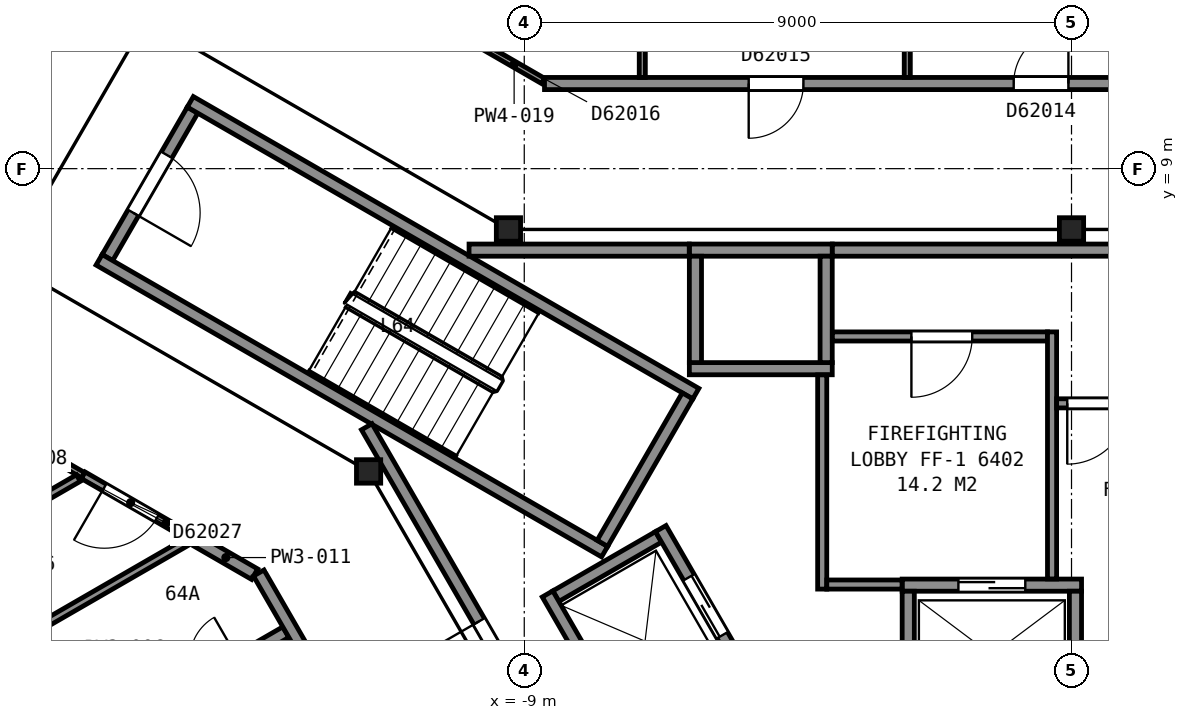
"""IFC4 building model, lengths in metres.
Left out: names, types, materials, properties, quantities, classifications, styles, units other than length and angle.
Written with IfcOpenShell. Run it as: python <this file> out.ifc"""

import sys

from ifc_helpers import new_model, si_unit, direction, frame, frame_2d, origin, origin_2d, place, context, subcontext, project, spatial, rectangle, i_section, extrude, element, fill, save


model = new_model("IFC4")
c1 = context("Model", 3, precision=1e-05, world=origin(), true_north=direction((0.0, 1.0)))
c2 = subcontext(c1, "Body", "Model", "MODEL_VIEW")
j1 = project(units=[si_unit("LENGTHUNIT", "METRE"), si_unit("PLANEANGLEUNIT", "RADIAN")], contexts=[c1])
p1 = place(None, origin())
s1 = spatial("IfcSite", under=j1, at=p1, CompositionType="ELEMENT")
p2 = place(p1, origin())
s2 = spatial("IfcBuilding", under=s1, at=p2, CompositionType="ELEMENT")
p3 = place(p2, frame((0.0, 0.0, 254.5)))
s3 = spatial("IfcBuildingStorey", under=s2, at=p3, CompositionType="ELEMENT", Elevation=254.5)
p4 = place(p3, frame((0.0, 8.0, 0.0), z_axis=(0.0, 0.0, 1.0), x_axis=(1.0, 0.0, 0.0)))
e1 = element("IfcColumn", 1, at=p4, inside=s3, PredefinedType="COLUMN", context=c2, shape_type="SweptSolid", body=[
    extrude(i_section(OverallWidth=0.399, OverallDepth=0.386, WebThickness=0.021, FlangeThickness=0.033, FilletRadius=0.015, at=origin_2d()), origin(), (0.0, 0.0, 1.0), 3.67),
])
for number, where, z_axis, x_axis in (
    (2, (-9.26, 8.0, 0.0), (0.0, 0.0, 1.0), (1.0, 0.0, 0.0)),
    (3, (-11.56, 4.02, 0.0), (0.0, 0.0, 1.0), (1.0, 0.0, 0.0)),
):
    element("IfcColumn", number, at=place(p3, frame(where, z_axis=z_axis, x_axis=x_axis)), inside=s3, PredefinedType="COLUMN", context=c2, shape_type="SweptSolid", body=[
        extrude(i_section(OverallWidth=0.399, OverallDepth=0.386, WebThickness=0.021, FlangeThickness=0.033, FilletRadius=0.015, at=origin_2d()), origin(), (0.0, 0.0, 1.0), 3.635),
    ])
p5 = place(p3, frame((-14.455, 9.962, 0.0), z_axis=(0.0, 0.0, 1.0), x_axis=(-0.500049511043, -0.865996816683, 0.0)))
e4 = element("IfcWall", 4, at=p5, inside=s3, PredefinedType="PARTITIONING", context=c2, shape_type="SweptSolid", body=[
    extrude(rectangle(XDim=2.8, YDim=0.2, at=frame_2d((1.4, 0.0))), origin(), (0.0, 0.0, 1.0), 3.45),
])
p6 = place(p5, frame((0.85, 0.0, 0.0)))
e5 = element("IfcOpeningElement", 5, at=p6, cuts=e4, PredefinedType="OPENING", context=c2, shape_type="SweptSolid", body=[
    extrude(rectangle(XDim=1.1, YDim=2.1, at=frame_2d((0.55, 1.05))), frame((0.0, 0.11, 0.0), z_axis=(0.0, -1.0, 0.0), x_axis=(1.0, 0.0, 0.0)), (0.0, 0.0, 1.0), 0.22),
])
for number, where, z_axis, x_axis in (
    (6, (-7.678, 2.701, 0.0), (0.0, 0.0, 1.0), (-0.866, 0.5, 0.0)),
    (7, (-6.178, 5.299, 0.0), (0.0, 0.0, 1.0), (-0.866, 0.5, 0.0)),
):
    element("IfcWall", number, at=place(p3, frame(where, z_axis=z_axis, x_axis=x_axis)), inside=s3, PredefinedType="PARTITIONING", context=c2, shape_type="SweptSolid", body=[
        extrude(rectangle(XDim=9.6, YDim=0.2, at=frame_2d((4.8, 0.0))), origin(), (0.0, 0.0, 1.0), 3.45),
    ])
p7 = place(p3, frame((-6.315, 5.262, 0.0), z_axis=(0.0, 0.0, 1.0), x_axis=(-0.500049511043, -0.865996816683, 0.0)))
e8 = element("IfcWall", 8, at=p7, inside=s3, PredefinedType="PARTITIONING", context=c2, shape_type="SweptSolid", body=[
    extrude(rectangle(XDim=2.8, YDim=0.2, at=frame_2d((1.4, 0.0))), origin(), (0.0, 0.0, 1.0), 3.45),
])
p8 = place(p3, frame((-2.785, 2.15, 0.0), z_axis=(0.0, 0.0, 1.0), x_axis=(1.0, 0.0, 0.0)))
e9 = element("IfcWall", 9, at=p8, inside=s3, PredefinedType="PARTITIONING", context=c2, shape_type="SweptSolid", body=[
    extrude(rectangle(XDim=2.95, YDim=0.2, at=frame_2d((1.475, 0.0))), origin(), (0.0, 0.0, 1.0), 3.7),
])
p9 = place(p8, frame((0.925, 0.0, 0.0)))
e10 = element("IfcOpeningElement", 10, at=p9, cuts=e9, PredefinedType="OPENING", context=c2, shape_type="SweptSolid", body=[
    extrude(rectangle(XDim=1.1, YDim=2.1, at=frame_2d((0.55, 1.05))), frame((0.0, 0.11, 0.0), z_axis=(0.0, -1.0, 0.0), x_axis=(1.0, 0.0, 0.0)), (0.0, 0.0, 1.0), 0.22),
])
for number, where, z_axis, x_axis in (
    (11, (-6.285, 5.71, 0.0), (0.0, 0.0, 1.0), (1.0, 0.0, 0.0)),
    (12, (-6.285, 7.66, 0.0), (0.0, 0.0, 1.0), (1.0, 0.0, 0.0)),
):
    element("IfcWall", number, at=place(p3, frame(where, z_axis=z_axis, x_axis=x_axis)), inside=s3, PredefinedType="PARTITIONING", context=c2, shape_type="SweptSolid", body=[
        extrude(rectangle(XDim=2.35, YDim=0.2, at=frame_2d((1.175, 0.0))), origin(), (0.0, 0.0, 1.0), 3.7),
    ])
for number, where, z_axis, x_axis in (
    (13, (-8.48, 1.969, 0.0), (0.0, 0.0, 1.0), (0.866, 0.5, 0.0)),
    (14, (0.065, 0.1, 0.0), (0.0, 0.0, 1.0), (0.0, 1.0, 0.0)),
    (15, (-2.685, 0.1, 0.0), (0.0, 0.0, 1.0), (0.0, 1.0, 0.0)),
):
    element("IfcWall", number, at=place(p3, frame(where, z_axis=z_axis, x_axis=x_axis)), inside=s3, PredefinedType="PARTITIONING", context=c2, shape_type="SweptSolid", body=[
        extrude(rectangle(XDim=1.95, YDim=0.2, at=frame_2d((0.975, 0.0))), origin(), (0.0, 0.0, 1.0), 3.7),
    ])
for number, where, z_axis, x_axis in (
    (16, (-4.035, 5.81, 0.0), (0.0, 0.0, 1.0), (0.0, 1.0, 0.0)),
    (17, (-6.185, 5.81, 0.0), (0.0, 0.0, 1.0), (0.0, 1.0, 0.0)),
):
    element("IfcWall", number, at=place(p3, frame(where, z_axis=z_axis, x_axis=x_axis)), inside=s3, PredefinedType="PARTITIONING", context=c2, shape_type="SweptSolid", body=[
        extrude(rectangle(XDim=1.75, YDim=0.2, at=frame_2d((0.875, 0.0))), origin(), (0.0, 0.0, 1.0), 3.7),
    ])
p10 = place(p3, frame((-5.28, 0.525, 0.0), z_axis=(0.0, 0.0, 1.0), x_axis=(-0.500037662692, 0.866003658127, 0.0)))
e18 = element("IfcWall", 18, at=p10, inside=s3, PredefinedType="PARTITIONING", context=c2, shape_type="SweptSolid", body=[
    extrude(rectangle(XDim=2.95, YDim=0.2, at=frame_2d((1.475, 0.0))), origin(), (0.0, 0.0, 1.0), 3.7),
])
p11 = place(p10, frame((0.925, 0.0, 0.0)))
e19 = element("IfcOpeningElement", 19, at=p11, cuts=e18, PredefinedType="OPENING", context=c2, shape_type="SweptSolid", body=[
    extrude(rectangle(XDim=1.1, YDim=2.1, at=frame_2d((0.55, 1.05))), frame((0.0, 0.11, 0.0), z_axis=(0.0, -1.0, 0.0), x_axis=(1.0, 0.0, 0.0)), (0.0, 0.0, 1.0), 0.22),
])
p12 = place(p3, frame((-7.242, -0.376, 0.0), z_axis=(0.0, 0.0, 1.0), x_axis=(-0.499996545922, 0.866027397988, 0.0)))
e20 = element("IfcWall", 20, at=p12, inside=s3, PredefinedType="PARTITIONING", context=c2, shape_type="SweptSolid", body=[
    extrude(rectangle(XDim=2.75, YDim=0.2, at=frame_2d((1.375, 0.0))), origin(), (0.0, 0.0, 1.0), 3.7),
])
p13 = place(p3, frame((-11.591, 4.755, 0.0), z_axis=(0.0, 0.0, 1.0), x_axis=(0.500043977787, -0.866000011708, 0.0)))
e21 = element("IfcWall", 21, at=p13, inside=s3, PredefinedType="PARTITIONING", context=c2, shape_type="SweptSolid", body=[
    extrude(rectangle(XDim=6.617, YDim=0.2, at=frame_2d((3.308, 0.0))), origin(), (0.0, 0.0, 1.0), 3.45),
])
p14 = place(p13, frame((3.695, 0.0, 0.0)))
e22 = element("IfcOpeningElement", 22, at=p14, cuts=e21, PredefinedType="OPENING", context=c2, shape_type="SweptSolid", body=[
    extrude(rectangle(XDim=1.8, YDim=2.1, at=frame_2d((0.9, 1.05))), frame((0.0, 0.11, 0.0), z_axis=(0.0, -1.0, 0.0), x_axis=(1.0, 0.0, 0.0)), (0.0, 0.0, 1.0), 0.22),
])
p15 = place(p3, frame((-9.908, 7.66, 0.0), z_axis=(0.0, 0.0, 1.0), x_axis=(1.0, 0.0, 0.0)))
e23 = element("IfcWall", 23, at=p15, inside=s3, PredefinedType="PARTITIONING", context=c2, shape_type="SweptSolid", body=[
    extrude(rectangle(XDim=3.621, YDim=0.2, at=frame_2d((1.811, 0.0))), origin(), (0.0, 0.0, 1.0), 3.45),
])
p16 = place(p3, frame((-4.1, 2.085, 0.0), z_axis=(0.0, 0.0, 1.0), x_axis=(0.0, 1.0, 0.0)))
e24 = element("IfcWall", 24, at=p16, inside=s3, PredefinedType="PARTITIONING", context=c2, shape_type="SweptSolid", body=[
    extrude(rectangle(XDim=3.523, YDim=0.15, at=frame_2d((1.761, 0.0))), origin(), (0.0, 0.0, 1.0), 3.45),
])
p17 = place(p3, frame((-4.025, 2.16, 0.0), z_axis=(0.0, 0.0, 1.0), x_axis=(1.0, 0.0, 0.0)))
e25 = element("IfcWall", 25, at=p17, inside=s3, PredefinedType="PARTITIONING", context=c2, shape_type="SweptSolid", body=[
    extrude(rectangle(XDim=1.238, YDim=0.15, at=frame_2d((0.619, 0.0))), origin(), (0.0, 0.0, 1.0), 3.45),
])
p18 = place(p3, frame((-3.933, 6.24, 0.0), z_axis=(0.0, 0.0, 1.0), x_axis=(1.0, 0.0, 0.0)))
e26 = element("IfcWall", 26, at=p18, inside=s3, PredefinedType="PARTITIONING", context=c2, shape_type="SweptSolid", body=[
    extrude(rectangle(XDim=3.538, YDim=0.15, at=frame_2d((1.769, 0.0))), origin(), (0.0, 0.0, 1.0), 3.45),
])
p19 = place(p18, frame((1.3, 0.0, 0.0)))
e27 = element("IfcOpeningElement", 27, at=p19, cuts=e26, PredefinedType="OPENING", context=c2, shape_type="SweptSolid", body=[
    extrude(rectangle(XDim=1.0, YDim=2.1, at=frame_2d((0.5, 1.05))), frame((0.0, 0.085, 0.0), z_axis=(0.0, -1.0, 0.0), x_axis=(1.0, 0.0, 0.0)), (0.0, 0.0, 1.0), 0.17),
])
p20 = place(p3, frame((-3.933, 7.66, 0.0), z_axis=(0.0, 0.0, 1.0), x_axis=(1.0, 0.0, 0.0)))
e28 = element("IfcWall", 28, at=p20, inside=s3, PredefinedType="PARTITIONING", context=c2, shape_type="SweptSolid", body=[
    extrude(rectangle(XDim=13.841, YDim=0.2, at=frame_2d((6.92, 0.0))), origin(), (0.0, 0.0, 1.0), 3.45),
])
p21 = place(p3, frame((-0.32, 2.252, 0.0), z_axis=(0.0, 0.0, 1.0), x_axis=(0.0, 1.0, 0.0)))
e29 = element("IfcWall", 29, at=p21, inside=s3, PredefinedType="PARTITIONING", context=c2, shape_type="SweptSolid", body=[
    extrude(rectangle(XDim=4.063, YDim=0.15, at=frame_2d((2.031, 0.0))), origin(), (0.0, 0.0, 1.0), 3.45),
])
p22 = place(p3, frame((-0.245, 5.14, 0.0), z_axis=(0.0, 0.0, 1.0), x_axis=(1.0, 0.0, 0.0)))
e30 = element("IfcWall", 30, at=p22, inside=s3, PredefinedType="PARTITIONING", context=c2, shape_type="SweptSolid", body=[
    extrude(rectangle(XDim=5.11, YDim=0.15, at=frame_2d((2.555, 0.0))), origin(), (0.0, 0.0, 1.0), 3.45),
])
p23 = place(p22, frame((0.175, 0.0, 0.0)))
e31 = element("IfcOpeningElement", 31, at=p23, cuts=e30, PredefinedType="OPENING", context=c2, shape_type="SweptSolid", body=[
    extrude(rectangle(XDim=1.0, YDim=2.1, at=frame_2d((0.5, 1.05))), frame((0.0, 0.085, 0.0), z_axis=(0.0, -1.0, 0.0), x_axis=(1.0, 0.0, 0.0)), (0.0, 0.0, 1.0), 0.17),
])
p24 = place(p3, frame((-16.253, 3.957, 0.0), z_axis=(0.0, 0.0, 1.0), x_axis=(-0.866006514596, 0.500032715607, 0.0)))
e32 = element("IfcWall", 32, at=p24, inside=s3, PredefinedType="PARTITIONING", context=c2, shape_type="SweptSolid", body=[
    extrude(rectangle(XDim=5.199, YDim=0.1, at=frame_2d((2.6, 0.0))), origin(), (0.0, 0.0, 1.0), 2.362),
])
p25 = place(p24, frame((1.978, 0.0, 0.0)))
e33 = element("IfcOpeningElement", 33, at=p25, cuts=e32, PredefinedType="OPENING", context=c2, shape_type="SweptSolid", body=[
    extrude(rectangle(XDim=0.9, YDim=2.1, at=frame_2d((0.45, 1.05))), frame((0.0, 0.06, 0.0), z_axis=(0.0, -1.0, 0.0), x_axis=(1.0, 0.0, 0.0)), (0.0, 0.0, 1.0), 0.12),
])
p26 = place(p3, frame((-20.824, 6.539, 0.0), z_axis=(0.0, 0.0, 1.0), x_axis=(0.500297300687, 0.865853689098, 0.0)))
e34 = element("IfcWall", 34, at=p26, inside=s3, PredefinedType="PARTITIONING", context=c2, shape_type="SweptSolid", body=[
    extrude(rectangle(XDim=9.496, YDim=0.1, at=frame_2d((4.748, 0.0))), origin(), (0.0, 0.0, 1.0), 2.362),
])
p27 = place(p26, frame((4.3, 0.0, 0.0)))
e35 = element("IfcOpeningElement", 35, at=p27, cuts=e34, PredefinedType="OPENING", context=c2, shape_type="SweptSolid", body=[
    extrude(rectangle(XDim=0.9, YDim=2.1, at=frame_2d((0.45, 1.05))), frame((0.0, 0.06, 0.0), z_axis=(0.0, -1.0, 0.0), x_axis=(1.0, 0.0, 0.0)), (0.0, 0.0, 1.0), 0.12),
])
p28 = place(p3, frame((-20.418, 1.553, 0.0), z_axis=(0.0, 0.0, 1.0), x_axis=(0.8660976733, 0.49987480463, 0.0)))
e36 = element("IfcWall", 36, at=p28, inside=s3, PredefinedType="PARTITIONING", context=c2, shape_type="SweptSolid", body=[
    extrude(rectangle(XDim=4.717, YDim=0.125, at=frame_2d((2.358, 0.0))), origin(), (0.0, 0.0, 1.0), 2.362),
])
p29 = place(p3, frame((-19.518, -0.006, 0.0), z_axis=(0.0, 0.0, 1.0), x_axis=(0.866072118736, 0.499919078599, 0.0)))
e37 = element("IfcWall", 37, at=p29, inside=s3, PredefinedType="PARTITIONING", context=c2, shape_type="SweptSolid", body=[
    extrude(rectangle(XDim=5.912, YDim=0.125, at=frame_2d((2.956, 0.0))), origin(), (0.0, 0.0, 1.0), 2.362),
])
p30 = place(p3, frame((-17.149, 1.236, 0.0), z_axis=(0.0, 0.0, 1.0), x_axis=(0.842376529327, -0.538889397593, 0.0)))
e38 = element("IfcWall", 38, at=p30, inside=s3, PredefinedType="PARTITIONING", context=c2, shape_type="SweptSolid", body=[
    extrude(rectangle(XDim=2.108, YDim=0.2, at=frame_2d((1.054, 0.0))), origin(), (0.0, 0.0, 1.0), 2.362),
])
p31 = place(p3, frame((-16.253, 3.957, 0.0), z_axis=(0.0, 0.0, 1.0), x_axis=(0.866173232673, -0.499743865396, 0.0)))
e39 = element("IfcWall", 39, at=p31, inside=s3, PredefinedType="PARTITIONING", context=c2, shape_type="SweptSolid", body=[
    extrude(rectangle(XDim=1.974, YDim=0.125, at=frame_2d((0.987, 0.0))), origin(), (0.0, 0.0, 1.0), 2.362),
])
p32 = place(p31, frame((0.4, 0.0, 0.0)))
e40 = element("IfcOpeningElement", 40, at=p32, cuts=e39, PredefinedType="OPENING", context=c2, shape_type="SweptSolid", body=[
    extrude(rectangle(XDim=1.0, YDim=2.1, at=frame_2d((0.5, 1.05))), frame((0.0, 0.073, 0.0), z_axis=(0.0, -1.0, 0.0), x_axis=(1.0, 0.0, 0.0)), (0.0, 0.0, 1.0), 0.145),
])
p33 = place(p3, frame((-15.346, -0.023, 0.0), z_axis=(0.0, 0.0, 1.0), x_axis=(0.865969158485, 0.500097407065, 0.0)))
e41 = element("IfcWall", 41, at=p33, inside=s3, PredefinedType="PARTITIONING", context=c2, shape_type="SweptSolid", body=[
    extrude(rectangle(XDim=2.799, YDim=0.2, at=frame_2d((1.4, 0.0))), origin(), (0.0, 0.0, 1.0), 2.362),
])
p34 = place(p33, frame((1.1, 0.0, 0.0)))
e42 = element("IfcOpeningElement", 42, at=p34, cuts=e41, PredefinedType="OPENING", context=c2, shape_type="SweptSolid", body=[
    extrude(rectangle(XDim=0.8, YDim=2.1, at=frame_2d((0.4, 1.05))), frame((0.0, 0.11, 0.0), z_axis=(0.0, -1.0, 0.0), x_axis=(1.0, 0.0, 0.0)), (0.0, 0.0, 1.0), 0.22),
])
p35 = place(p3, frame((-14.381, 2.877, 0.0), z_axis=(0.0, 0.0, 1.0), x_axis=(0.866215333661, -0.499670887416, 0.0)))
e43 = element("IfcWall", 43, at=p35, inside=s3, PredefinedType="PARTITIONING", context=c2, shape_type="SweptSolid", body=[
    extrude(rectangle(XDim=1.093, YDim=0.2, at=frame_2d((0.546, 0.0))), origin(), (0.0, 0.0, 1.0), 2.362),
])
p36 = place(p3, frame((-4.675, -12.706, 0.0), z_axis=(0.0, 0.0, 1.0), x_axis=(-0.499972470324, 0.866041297467, 0.0)))
e44 = element("IfcWall", 44, at=p36, inside=s3, PredefinedType="PARTITIONING", context=c2, shape_type="SweptSolid", body=[
    extrude(rectangle(XDim=17.385, YDim=0.2, at=frame_2d((8.692, 0.0))), origin(), (0.0, 0.0, 1.0), 2.362),
])
p37 = place(p36, frame((14.57, 0.0, 0.0)))
e45 = element("IfcOpeningElement", 45, at=p37, cuts=e44, PredefinedType="OPENING", context=c2, shape_type="SweptSolid", body=[
    extrude(rectangle(XDim=0.9, YDim=2.1, at=frame_2d((0.45, 1.05))), frame((0.0, 0.11, 0.0), z_axis=(0.0, -1.0, 0.0), x_axis=(1.0, 0.0, 0.0)), (0.0, 0.0, 1.0), 0.22),
])
p38 = place(p36, frame((11.777, 0.0, 0.0)))
e46 = element("IfcOpeningElement", 46, at=p38, cuts=e44, PredefinedType="OPENING", context=c2, shape_type="SweptSolid", body=[
    extrude(rectangle(XDim=0.9, YDim=2.1, at=frame_2d((0.45, 1.05))), frame((0.0, 0.11, 0.0), z_axis=(0.0, -1.0, 0.0), x_axis=(1.0, 0.0, 0.0)), (0.0, 0.0, 1.0), 0.22),
])
p39 = place(p36, frame((5.095, 0.0, 0.0)))
e47 = element("IfcOpeningElement", 47, at=p39, cuts=e44, PredefinedType="OPENING", context=c2, shape_type="SweptSolid", body=[
    extrude(rectangle(XDim=0.9, YDim=2.1, at=frame_2d((0.45, 1.05))), frame((0.0, 0.11, 0.0), z_axis=(0.0, -1.0, 0.0), x_axis=(1.0, 0.0, 0.0)), (0.0, 0.0, 1.0), 0.22),
])
p40 = place(p3, frame((-11.357, 11.982, 0.0), z_axis=(0.0, 0.0, 1.0), x_axis=(0.866039032844, -0.499976393034, 0.0)))
e48 = element("IfcWall", 48, at=p40, inside=s3, PredefinedType="PARTITIONING", context=c2, shape_type="SweptSolid", body=[
    extrude(rectangle(XDim=3.079, YDim=0.1, at=frame_2d((1.54, 0.0))), origin(), (0.0, 0.0, 1.0), 2.362),
])
p41 = place(p40, frame((1.08, 0.0, 0.0)))
e49 = element("IfcOpeningElement", 49, at=p41, cuts=e48, PredefinedType="OPENING", context=c2, shape_type="SweptSolid", body=[
    extrude(rectangle(XDim=0.9, YDim=2.1, at=frame_2d((0.45, 1.05))), frame((0.0, 0.06, 0.0), z_axis=(0.0, -1.0, 0.0), x_axis=(1.0, 0.0, 0.0)), (0.0, 0.0, 1.0), 0.12),
])
p42 = place(p3, frame((-8.667, 10.4, 0.0), z_axis=(0.0, 0.0, 1.0), x_axis=(1.0, 0.0, 0.0)))
e50 = element("IfcWall", 50, at=p42, inside=s3, PredefinedType="PARTITIONING", context=c2, shape_type="SweptSolid", body=[
    extrude(rectangle(XDim=17.384, YDim=0.2, at=frame_2d((8.692, 0.0))), origin(), (0.0, 0.0, 1.0), 2.362),
])
p43 = place(p42, frame((12.425, 0.0, 0.0)))
e51 = element("IfcOpeningElement", 51, at=p43, cuts=e50, PredefinedType="OPENING", context=c2, shape_type="SweptSolid", body=[
    extrude(rectangle(XDim=0.9, YDim=2.1, at=frame_2d((0.45, 1.05))), frame((0.0, 0.11, 0.0), z_axis=(0.0, -1.0, 0.0), x_axis=(1.0, 0.0, 0.0)), (0.0, 0.0, 1.0), 0.22),
])
p44 = place(p42, frame((7.716, 0.0, 0.0)))
e52 = element("IfcOpeningElement", 52, at=p44, cuts=e50, PredefinedType="OPENING", context=c2, shape_type="SweptSolid", body=[
    extrude(rectangle(XDim=0.9, YDim=2.1, at=frame_2d((0.45, 1.05))), frame((0.0, 0.11, 0.0), z_axis=(0.0, -1.0, 0.0), x_axis=(1.0, 0.0, 0.0)), (0.0, 0.0, 1.0), 0.22),
])
p45 = place(p42, frame((3.358, 0.0, 0.0)))
e53 = element("IfcOpeningElement", 53, at=p45, cuts=e50, PredefinedType="OPENING", context=c2, shape_type="SweptSolid", body=[
    extrude(rectangle(XDim=0.9, YDim=2.1, at=frame_2d((0.45, 1.05))), frame((0.0, 0.11, 0.0), z_axis=(0.0, -1.0, 0.0), x_axis=(1.0, 0.0, 0.0)), (0.0, 0.0, 1.0), 0.22),
])
for number, where, z_axis, x_axis in (
    (54, (-7.059, 10.5, 0.0), (0.0, 0.0, 1.0), (0.0, 1.0, 0.0)),
    (55, (-2.701, 10.5, 0.0), (0.0, 0.0, 1.0), (0.0, 1.0, 0.0)),
):
    element("IfcWall", number, at=place(p3, frame(where, z_axis=z_axis, x_axis=x_axis)), inside=s3, PredefinedType="PARTITIONING", context=c2, shape_type="SweptSolid", body=[
        extrude(rectangle(XDim=6.406, YDim=0.1, at=frame_2d((3.203, 0.0))), origin(), (0.0, 0.0, 1.0), 2.362),
    ])
p46 = place(p6, origin())
e56 = element("IfcDoor", 56, at=p46, inside=s3, OperationType="SINGLE_SWING_RIGHT", PredefinedType="DOOR", context=c2, shape_type="SweptSolid", body=[
    extrude(rectangle(XDim=1.1, YDim=2.1, at=frame_2d((0.55, 1.05))), frame((0.0, 0.025, 0.0), z_axis=(0.0, -1.0, 0.0), x_axis=(1.0, 0.0, 0.0)), (0.0, 0.0, 1.0), 0.05),
])
fill(e5, e56)
p47 = place(p9, origin())
e57 = element("IfcDoor", 57, at=p47, inside=s3, OperationType="SLIDING_TO_LEFT", PredefinedType="DOOR", context=c2, shape_type="SweptSolid", body=[
    extrude(rectangle(XDim=1.1, YDim=2.1, at=frame_2d((0.55, 1.05))), frame((0.0, 0.025, 0.0), z_axis=(0.0, -1.0, 0.0), x_axis=(1.0, 0.0, 0.0)), (0.0, 0.0, 1.0), 0.05),
])
fill(e10, e57)
p48 = place(p11, origin())
e58 = element("IfcDoor", 58, at=p48, inside=s3, OperationType="SLIDING_TO_LEFT", PredefinedType="DOOR", context=c2, shape_type="SweptSolid", body=[
    extrude(rectangle(XDim=1.1, YDim=2.1, at=frame_2d((0.55, 1.05))), frame((0.0, 0.025, 0.0), z_axis=(0.0, -1.0, 0.0), x_axis=(1.0, 0.0, 0.0)), (0.0, 0.0, 1.0), 0.05),
])
fill(e19, e58)
p49 = place(p14, origin())
e59 = element("IfcDoor", 59, at=p49, inside=s3, OperationType="DOUBLE_DOOR_SINGLE_SWING", PredefinedType="DOOR", context=c2, shape_type="SweptSolid", body=[
    extrude(rectangle(XDim=1.8, YDim=2.1, at=frame_2d((0.9, 1.05))), frame((0.0, 0.025, 0.0), z_axis=(0.0, -1.0, 0.0), x_axis=(1.0, 0.0, 0.0)), (0.0, 0.0, 1.0), 0.05),
])
fill(e22, e59)
p50 = place(p19, origin())
e60 = element("IfcDoor", 60, at=p50, inside=s3, OperationType="SINGLE_SWING_LEFT", PredefinedType="DOOR", context=c2, shape_type="SweptSolid", body=[
    extrude(rectangle(XDim=1.0, YDim=2.1, at=frame_2d((0.5, 1.05))), frame((0.0, 0.025, 0.0), z_axis=(0.0, -1.0, 0.0), x_axis=(1.0, 0.0, 0.0)), (0.0, 0.0, 1.0), 0.05),
])
fill(e27, e60)
p51 = place(p23, origin())
e61 = element("IfcDoor", 61, at=p51, inside=s3, OperationType="SINGLE_SWING_LEFT", PredefinedType="DOOR", context=c2, shape_type="SweptSolid", body=[
    extrude(rectangle(XDim=1.0, YDim=2.1, at=frame_2d((0.5, 1.05))), frame((0.0, 0.025, 0.0), z_axis=(0.0, -1.0, 0.0), x_axis=(1.0, 0.0, 0.0)), (0.0, 0.0, 1.0), 0.05),
])
fill(e31, e61)
p52 = place(p32, origin())
e62 = element("IfcDoor", 62, at=p52, inside=s3, OperationType="SINGLE_SWING_LEFT", PredefinedType="DOOR", context=c2, shape_type="SweptSolid", body=[
    extrude(rectangle(XDim=1.0, YDim=2.1, at=frame_2d((0.5, 1.05))), frame((0.0, 0.025, 0.0), z_axis=(0.0, -1.0, 0.0), x_axis=(1.0, 0.0, 0.0)), (0.0, 0.0, 1.0), 0.05),
])
fill(e40, e62)
p53 = place(p44, origin())
e63 = element("IfcDoor", 63, at=p53, inside=s3, OperationType="SINGLE_SWING_RIGHT", PredefinedType="DOOR", context=c2, shape_type="SweptSolid", body=[
    extrude(rectangle(XDim=0.9, YDim=2.1, at=frame_2d((0.45, 1.05))), frame((0.0, 0.025, 0.0), z_axis=(0.0, -1.0, 0.0), x_axis=(1.0, 0.0, 0.0)), (0.0, 0.0, 1.0), 0.05),
])
fill(e52, e63)
p54 = place(p45, origin())
e64 = element("IfcDoor", 64, at=p54, inside=s3, OperationType="SINGLE_SWING_LEFT", PredefinedType="DOOR", context=c2, shape_type="SweptSolid", body=[
    extrude(rectangle(XDim=0.9, YDim=2.1, at=frame_2d((0.45, 1.05))), frame((0.0, 0.025, 0.0), z_axis=(0.0, -1.0, 0.0), x_axis=(1.0, 0.0, 0.0)), (0.0, 0.0, 1.0), 0.05),
])
fill(e53, e64)
save(model, sys.argv[1])
